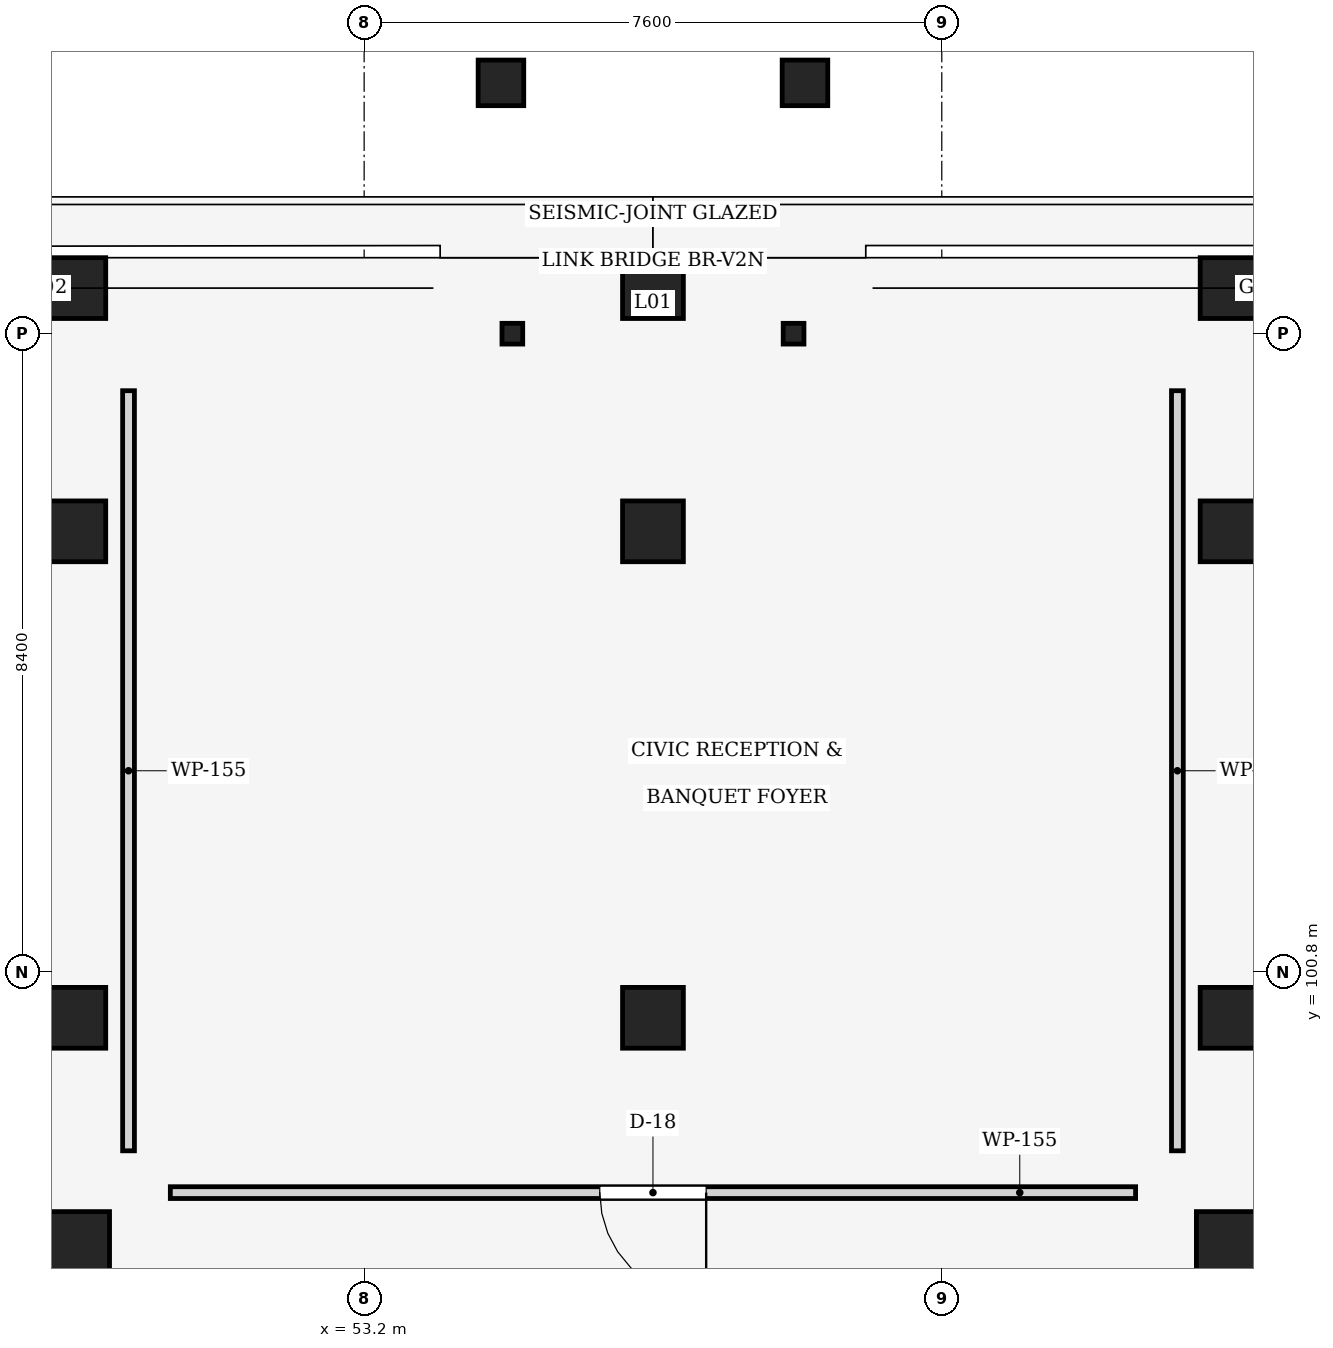
"""IFC4 building model, lengths in metres.
Left out: names, types, materials, properties, quantities, classifications, styles, units other than length and angle.
Written with IfcOpenShell. Run it as: python <this file> out.ifc"""

import sys

from ifc_helpers import new_model, si_unit, direction, frame, frame_2d, origin, origin_2d, place, context, subcontext, project, spatial, rectangle, hollow_circle, extrude, element, fill, save


model = new_model("IFC4")
c1 = context("Model", 3, precision=1e-05, world=origin(), true_north=direction((0.0, 1.0)))
c2 = subcontext(c1, "Body", "Model", "MODEL_VIEW")
j1 = project(units=[si_unit("LENGTHUNIT", "METRE"), si_unit("PLANEANGLEUNIT", "RADIAN")], contexts=[c1])
p1 = place(None, origin())
s1 = spatial("IfcSite", under=j1, at=p1, CompositionType="ELEMENT")
p2 = place(p1, origin())
s2 = spatial("IfcBuilding", under=s1, at=p2, CompositionType="ELEMENT")
p3 = place(p2, frame((0.0, 0.0, 5.1)))
s3 = spatial("IfcBuildingStorey", under=s2, at=p3, CompositionType="ELEMENT", Elevation=5.1)
for number, where, z_axis, x_axis in (
    (1, (49.4, 97.2, 0.0), (0.0, 0.0, 1.0), (1.0, 0.0, 0.0)),
    (2, (64.6, 97.2, 0.0), (0.0, 0.0, 1.0), (1.0, 0.0, 0.0)),
):
    element("IfcColumn", number, at=place(p3, frame(where, z_axis=z_axis, x_axis=x_axis)), inside=s3, PredefinedType="COLUMN", context=c2, shape_type="SweptSolid", body=[
        extrude(rectangle(XDim=0.9, YDim=0.9, at=origin_2d()), origin(), (0.0, 0.0, 1.0), 4.05),
    ])
for number, where, z_axis, x_axis in (
    (3, (49.4, 100.2, 0.0), (0.0, 0.0, 1.0), (1.0, 0.0, 0.0)),
    (4, (57.0, 100.2, 0.0), (0.0, 0.0, 1.0), (1.0, 0.0, 0.0)),
    (5, (64.6, 100.2, 0.0), (0.0, 0.0, 1.0), (1.0, 0.0, 0.0)),
    (6, (49.4, 106.6, 0.0), (0.0, 0.0, 1.0), (1.0, 0.0, 0.0)),
    (7, (57.0, 106.6, 0.0), (0.0, 0.0, 1.0), (1.0, 0.0, 0.0)),
    (8, (64.6, 106.6, 0.0), (0.0, 0.0, 1.0), (1.0, 0.0, 0.0)),
    (9, (49.4, 109.8, 0.0), (0.0, 0.0, 1.0), (1.0, 0.0, 0.0)),
    (10, (57.0, 109.8, 0.0), (0.0, 0.0, 1.0), (1.0, 0.0, 0.0)),
    (11, (64.6, 109.8, 0.0), (0.0, 0.0, 1.0), (1.0, 0.0, 0.0)),
):
    element("IfcColumn", number, at=place(p3, frame(where, z_axis=z_axis, x_axis=x_axis)), inside=s3, PredefinedType="COLUMN", context=c2, shape_type="SweptSolid", body=[
        extrude(rectangle(XDim=0.8, YDim=0.8, at=origin_2d()), origin(), (0.0, 0.0, 1.0), 4.05),
    ])
for number, where, z_axis, x_axis in (
    (12, (55.15, 109.2, 0.0), (0.0, 0.0, 1.0), (1.0, 0.0, 0.0)),
    (13, (58.85, 109.2, 0.0), (0.0, 0.0, 1.0), (1.0, 0.0, 0.0)),
):
    element("IfcColumn", number, at=place(p3, frame(where, z_axis=z_axis, x_axis=x_axis)), inside=s3, PredefinedType="COLUMN", context=c2, shape_type="SweptSolid", body=[
        extrude(hollow_circle(Radius=0.136, WallThickness=0.016, at=origin_2d()), origin(), (0.0, 0.0, 1.0), 4.05),
    ])
for number, where, z_axis, x_axis in (
    (14, (55.0, 112.5, 0.0), (0.0, 0.0, 1.0), (1.0, 0.0, 0.0)),
    (15, (59.0, 112.5, 0.0), (0.0, 0.0, 1.0), (1.0, 0.0, 0.0)),
):
    element("IfcColumn", number, at=place(p3, frame(where, z_axis=z_axis, x_axis=x_axis)), inside=s3, PredefinedType="COLUMN", context=c2, shape_type="SweptSolid", body=[
        extrude(rectangle(XDim=0.6, YDim=0.6, at=origin_2d()), origin(), (0.0, 0.0, 1.0), 4.05),
    ])
p4 = place(p3, frame((63.35, 97.9, 0.0), z_axis=(0.0, 0.0, 1.0), x_axis=(-1.0, 0.0, 0.0)))
e16 = element("IfcWall", 16, at=p4, inside=s3, PredefinedType="PARTITIONING", context=c2, shape_type="SweptSolid", body=[
    extrude(rectangle(XDim=12.7, YDim=0.155, at=frame_2d((6.35, 0.0))), origin(), (0.0, 0.0, 1.0), 3.68),
])
p5 = place(p4, frame((5.65, 0.0, 0.0)))
e17 = element("IfcOpeningElement", 17, at=p5, cuts=e16, PredefinedType="OPENING", context=c2, shape_type="SweptSolid", body=[
    extrude(rectangle(XDim=1.4, YDim=2.35, at=frame_2d((0.7, 1.175))), frame((0.0, 0.087, 0.0), z_axis=(0.0, -1.0, 0.0), x_axis=(1.0, 0.0, 0.0)), (0.0, 0.0, 1.0), 0.175),
])
for number, where, z_axis, x_axis in (
    (18, (63.9, 108.45, 0.0), (0.0, 0.0, 1.0), (0.0, -1.0, 0.0)),
    (19, (50.1, 98.45, 0.0), (0.0, 0.0, 1.0), (0.0, 1.0, 0.0)),
):
    element("IfcWall", number, at=place(p3, frame(where, z_axis=z_axis, x_axis=x_axis)), inside=s3, PredefinedType="PARTITIONING", context=c2, shape_type="SweptSolid", body=[
        extrude(rectangle(XDim=10.0, YDim=0.155, at=frame_2d((5.0, 0.0))), origin(), (0.0, 0.0, 1.0), 3.145),
    ])
p6 = place(p5, origin())
e20 = element("IfcDoor", 20, at=p6, inside=s3, OperationType="SINGLE_SWING_LEFT", PredefinedType="DOOR", context=c2, shape_type="SweptSolid", body=[
    extrude(rectangle(XDim=1.4, YDim=2.35, at=frame_2d((0.7, 1.175))), frame((0.0, 0.025, 0.0), z_axis=(0.0, -1.0, 0.0), x_axis=(1.0, 0.0, 0.0)), (0.0, 0.0, 1.0), 0.05),
])
fill(e17, e20)
save(model, sys.argv[1])
